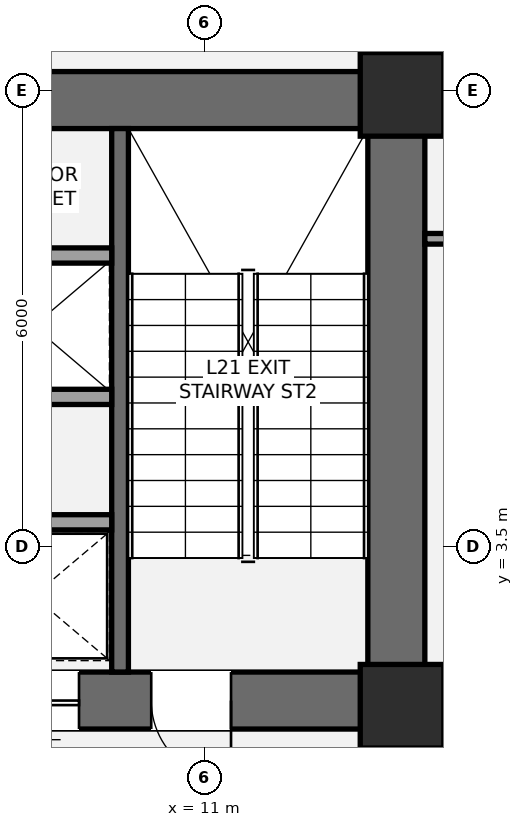
"""IFC4 building model, lengths in metres.
Left out: names, types, materials, properties, quantities, classifications, styles, units other than length and angle.
Written with IfcOpenShell. Run it as: python <this file> out.ifc"""

import sys

from ifc_helpers import new_model, si_unit, direction, frame, frame_2d, origin, origin_2d, place, context, subcontext, project, spatial, rectangle, extrude, element, fill, save


model = new_model("IFC4")
c1 = context("Model", 3, precision=1e-05, world=origin(), true_north=direction((0.0, 1.0)))
c2 = subcontext(c1, "Body", "Model", "MODEL_VIEW")
j1 = project(units=[si_unit("LENGTHUNIT", "METRE"), si_unit("PLANEANGLEUNIT", "RADIAN")], contexts=[c1])
p1 = place(None, origin())
s1 = spatial("IfcSite", under=j1, at=p1, CompositionType="ELEMENT")
p2 = place(p1, origin())
s2 = spatial("IfcBuilding", under=s1, at=p2, CompositionType="ELEMENT")
p3 = place(p2, frame((0.0, 0.0, 81.9)))
s3 = spatial("IfcBuildingStorey", under=s2, at=p3, CompositionType="ELEMENT", Elevation=81.9)
p4 = place(p3, frame((13.525, 1.1, 0.0), z_axis=(0.0, 0.0, 1.0), x_axis=(0.0, 1.0, 0.0)))
e1 = element("IfcWall", 1, at=p4, inside=s3, PredefinedType="SHEAR", context=c2, shape_type="SweptSolid", body=[
    extrude(rectangle(XDim=8.65, YDim=0.75, at=frame_2d((4.325, 0.0))), origin(), (0.0, 0.0, 1.0), 4.2),
])
p5 = place(p3, frame((4.425, 9.375, 0.0), z_axis=(0.0, 0.0, 1.0), x_axis=(1.0, 0.0, 0.0)))
e2 = element("IfcWall", 2, at=p5, inside=s3, PredefinedType="SHEAR", context=c2, shape_type="SweptSolid", body=[
    extrude(rectangle(XDim=9.475, YDim=0.75, at=frame_2d((4.737, 0.0))), origin(), (0.0, 0.0, 1.0), 4.2),
])
p6 = place(p3, frame((13.9, 1.475, 0.0), z_axis=(0.0, 0.0, 1.0), x_axis=(-1.0, 0.0, 0.0)))
e3 = element("IfcWall", 3, at=p6, inside=s3, PredefinedType="SHEAR", context=c2, shape_type="SweptSolid", body=[
    extrude(rectangle(XDim=9.075, YDim=0.75, at=frame_2d((4.538, 0.0))), origin(), (0.0, 0.0, 1.0), 4.2),
])
p7 = place(p6, frame((2.55, 0.0, 0.0)))
e4 = element("IfcOpeningElement", 4, at=p7, cuts=e3, PredefinedType="OPENING", context=c2, shape_type="SweptSolid", body=[
    extrude(rectangle(XDim=1.05, YDim=2.15, at=frame_2d((0.525, 1.075))), frame((0.0, 0.385, 0.0), z_axis=(0.0, -1.0, 0.0), x_axis=(1.0, 0.0, 0.0)), (0.0, 0.0, 1.0), 0.77),
])
p8 = place(p6, frame((4.55, 0.0, 0.0)))
e5 = element("IfcOpeningElement", 5, at=p8, cuts=e3, PredefinedType="OPENING", context=c2, shape_type="SweptSolid", body=[
    extrude(rectangle(XDim=1.1, YDim=2.2, at=frame_2d((0.55, 1.1))), frame((0.0, 0.385, 0.0), z_axis=(0.0, -1.0, 0.0), x_axis=(1.0, 0.0, 0.0)), (0.0, 0.0, 1.0), 0.77),
])
p9 = place(p3, frame((9.89, 1.85, 0.0), z_axis=(0.0, 0.0, 1.0), x_axis=(0.0, 1.0, 0.0)))
e6 = element("IfcWall", 6, at=p9, inside=s3, PredefinedType="SHEAR", context=c2, shape_type="SweptSolid", body=[
    extrude(rectangle(XDim=7.15, YDim=0.22, at=frame_2d((3.575, 0.0))), origin(), (0.0, 0.0, 1.0), 4.2),
])
for number, where, z_axis, x_axis in (
    (7, (13.6, 1.4, 0.0), (0.0, 0.0, 1.0), (1.0, 0.0, 0.0)),
    (8, (13.6, 9.45, 0.0), (0.0, 0.0, 1.0), (1.0, 0.0, 0.0)),
):
    element("IfcColumn", number, at=place(p3, frame(where, z_axis=z_axis, x_axis=x_axis)), inside=s3, PredefinedType="COLUMN", context=c2, shape_type="SweptSolid", body=[
        extrude(rectangle(XDim=1.1, YDim=1.1, at=origin_2d()), origin(), (0.0, 0.0, 1.0), 4.2),
    ])
p10 = place(p3, frame((13.45, -2.15, 0.0), z_axis=(0.0, 0.0, 1.0), x_axis=(0.0, 1.0, 0.0)))
e9 = element("IfcWall", 9, at=p10, inside=s3, PredefinedType="PARTITIONING", context=c2, shape_type="SweptSolid", body=[
    extrude(rectangle(XDim=3.3, YDim=0.165, at=frame_2d((1.65, 0.0))), origin(), (0.0, 0.0, 1.0), 3.463),
])
p11 = place(p10, frame((1.15, 0.0, 0.0)))
e10 = element("IfcOpeningElement", 10, at=p11, cuts=e9, PredefinedType="OPENING", context=c2, shape_type="SweptSolid", body=[
    extrude(rectangle(XDim=1.05, YDim=2.15, at=frame_2d((0.525, 1.075))), frame((0.0, 0.093, 0.0), z_axis=(0.0, -1.0, 0.0), x_axis=(1.0, 0.0, 0.0)), (0.0, 0.0, 1.0), 0.185),
])
p12 = place(p3, frame((5.575, 3.82, 0.0), z_axis=(0.0, 0.0, 1.0), x_axis=(1.0, 0.0, 0.0)))
e11 = element("IfcWall", 11, at=p12, inside=s3, PredefinedType="SOLIDWALL", context=c2, shape_type="SweptSolid", body=[
    extrude(rectangle(XDim=4.205, YDim=0.2, at=frame_2d((2.103, 0.0))), origin(), (0.0, 0.0, 1.0), 4.01),
])
p13 = place(p12, frame((0.65, 0.0, 0.0)))
e12 = element("IfcOpeningElement", 12, at=p13, cuts=e11, PredefinedType="OPENING", context=c2, shape_type="SweptSolid", body=[
    extrude(rectangle(XDim=1.2, YDim=2.2, at=frame_2d((0.6, 1.1))), frame((0.0, 0.11, 0.0), z_axis=(0.0, -1.0, 0.0), x_axis=(1.0, 0.0, 0.0)), (0.0, 0.0, 1.0), 0.22),
])
for number, where, z_axis, x_axis in (
    (13, (5.575, 5.47, 0.0), (0.0, 0.0, 1.0), (1.0, 0.0, 0.0)),
    (14, (5.575, 7.33, 0.0), (0.0, 0.0, 1.0), (1.0, 0.0, 0.0)),
):
    element("IfcWall", number, at=place(p3, frame(where, z_axis=z_axis, x_axis=x_axis)), inside=s3, PredefinedType="SOLIDWALL", context=c2, shape_type="SweptSolid", body=[
        extrude(rectangle(XDim=4.205, YDim=0.2, at=frame_2d((2.103, 0.0))), origin(), (0.0, 0.0, 1.0), 4.01),
    ])
p14 = place(p3, frame((13.9, 7.55, 0.0), z_axis=(0.0, 0.0, 1.0), x_axis=(1.0, 0.0, 0.0)))
e15 = element("IfcWall", 15, at=p14, inside=s3, PredefinedType="PARTITIONING", context=c2, shape_type="SweptSolid", body=[
    extrude(rectangle(XDim=11.979, YDim=0.14, at=frame_2d((5.99, 0.0))), origin(), (0.0, 0.0, 1.0), 3.463),
])
p15 = place(p14, frame((1.2, 0.0, 0.0)))
e16 = element("IfcOpeningElement", 16, at=p15, cuts=e15, PredefinedType="OPENING", context=c2, shape_type="SweptSolid", body=[
    extrude(rectangle(XDim=0.92, YDim=2.15, at=frame_2d((0.46, 1.075))), frame((0.0, 0.08, 0.0), z_axis=(0.0, -1.0, 0.0), x_axis=(1.0, 0.0, 0.0)), (0.0, 0.0, 1.0), 0.16),
])
p16 = place(p7, origin())
e17 = element("IfcDoor", 17, at=p16, inside=s3, OperationType="SINGLE_SWING_LEFT", PredefinedType="DOOR", context=c2, shape_type="SweptSolid", body=[
    extrude(rectangle(XDim=1.05, YDim=2.15, at=frame_2d((0.525, 1.075))), frame((0.0, 0.025, 0.0), z_axis=(0.0, -1.0, 0.0), x_axis=(1.0, 0.0, 0.0)), (0.0, 0.0, 1.0), 0.05),
])
fill(e4, e17)
p17 = place(p8, origin())
e18 = element("IfcDoor", 18, at=p17, inside=s3, OperationType="SLIDING_TO_LEFT", PredefinedType="DOOR", context=c2, shape_type="SweptSolid", body=[
    extrude(rectangle(XDim=1.1, YDim=2.2, at=frame_2d((0.55, 1.1))), frame((0.0, 0.025, 0.0), z_axis=(0.0, -1.0, 0.0), x_axis=(1.0, 0.0, 0.0)), (0.0, 0.0, 1.0), 0.05),
])
fill(e5, e18)
save(model, sys.argv[1])
